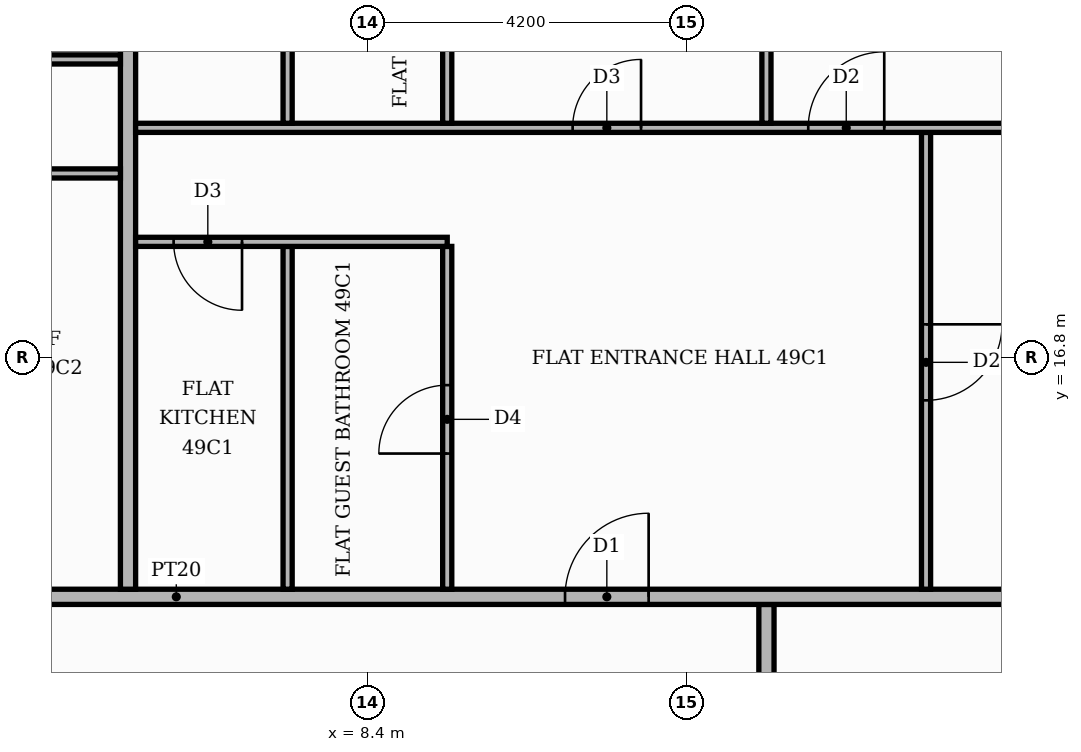
"""IFC4 building model, lengths in metres.
Left out: names, types, materials, properties, quantities, classifications, styles, units other than length and angle.
Written with IfcOpenShell. Run it as: python <this file> out.ifc"""

import sys

from ifc_helpers import new_model, si_unit, direction, frame, frame_2d, origin, place, context, subcontext, project, spatial, rectangle, extrude, element, fill, save


model = new_model("IFC4")
c1 = context("Model", 3, precision=1e-05, world=origin(), true_north=direction((0.0, 1.0)))
c2 = subcontext(c1, "Body", "Model", "MODEL_VIEW")
j1 = project(units=[si_unit("LENGTHUNIT", "METRE"), si_unit("PLANEANGLEUNIT", "RADIAN")], contexts=[c1])
p1 = place(None, origin())
s1 = spatial("IfcSite", under=j1, at=p1, CompositionType="ELEMENT")
p2 = place(p1, origin())
s2 = spatial("IfcBuilding", under=s1, at=p2, CompositionType="ELEMENT")
p3 = place(p2, frame((0.0, 0.0, 207.9)))
s3 = spatial("IfcBuildingStorey", under=s2, at=p3, CompositionType="ELEMENT", Elevation=207.9)
p4 = place(p3, frame((13.65, 11.1, 0.0), z_axis=(0.0, 0.0, 1.0), x_axis=(0.0, 1.0, 0.0)))
e1 = element("IfcWall", 1, at=p4, inside=s3, PredefinedType="PARTITIONING", context=c2, shape_type="SweptSolid", body=[
    extrude(rectangle(XDim=2.45, YDim=0.2, at=frame_2d((1.225, 0.0))), origin(), (0.0, 0.0, 1.0), 3.48),
])
p5 = place(p3, frame((-13.65, 13.65, 0.0), z_axis=(0.0, 0.0, 1.0), x_axis=(1.0, 0.0, 0.0)))
e2 = element("IfcWall", 2, at=p5, inside=s3, PredefinedType="PARTITIONING", context=c2, shape_type="SweptSolid", body=[
    extrude(rectangle(XDim=39.07, YDim=0.2, at=frame_2d((19.535, 0.0))), origin(), (0.0, 0.0, 1.0), 3.48),
])
p6 = place(p5, frame((24.65, 0.0, 0.0)))
e3 = element("IfcOpeningElement", 3, at=p6, cuts=e2, PredefinedType="OPENING", context=c2, shape_type="SweptSolid", body=[
    extrude(rectangle(XDim=1.1, YDim=2.4, at=frame_2d((0.55, 1.2))), frame((0.0, 0.11, 0.0), z_axis=(0.0, -1.0, 0.0), x_axis=(1.0, 0.0, 0.0)), (0.0, 0.0, 1.0), 0.22),
])
p7 = place(p5, frame((12.05, 0.0, 0.0)))
e4 = element("IfcOpeningElement", 4, at=p7, cuts=e2, PredefinedType="OPENING", context=c2, shape_type="SweptSolid", body=[
    extrude(rectangle(XDim=1.1, YDim=2.4, at=frame_2d((0.55, 1.2))), frame((0.0, 0.11, 0.0), z_axis=(0.0, -1.0, 0.0), x_axis=(1.0, 0.0, 0.0)), (0.0, 0.0, 1.0), 0.22),
])
p8 = place(p3, frame((5.25, 13.75, 0.0), z_axis=(0.0, 0.0, 1.0), x_axis=(0.0, 1.0, 0.0)))
e5 = element("IfcWall", 5, at=p8, inside=s3, PredefinedType="PARTITIONING", context=c2, shape_type="SweptSolid", body=[
    extrude(rectangle(XDim=11.67, YDim=0.2, at=frame_2d((5.835, 0.0))), origin(), (0.0, 0.0, 1.0), 3.48),
])
p9 = place(p3, frame((7.35, 13.75, 0.0), z_axis=(0.0, 0.0, 1.0), x_axis=(0.0, 1.0, 0.0)))
e6 = element("IfcWall", 6, at=p9, inside=s3, PredefinedType="PARTITIONING", context=c2, shape_type="SweptSolid", body=[
    extrude(rectangle(XDim=4.51, YDim=0.12, at=frame_2d((2.255, 0.0))), origin(), (0.0, 0.0, 1.0), 3.48),
])
p10 = place(p3, frame((9.45, 13.75, 0.0), z_axis=(0.0, 0.0, 1.0), x_axis=(0.0, 1.0, 0.0)))
e7 = element("IfcWall", 7, at=p10, inside=s3, PredefinedType="PARTITIONING", context=c2, shape_type="SweptSolid", body=[
    extrude(rectangle(XDim=4.51, YDim=0.12, at=frame_2d((2.255, 0.0))), origin(), (0.0, 0.0, 1.0), 3.48),
])
p11 = place(p10, frame((1.785, 0.0, 0.0)))
e8 = element("IfcOpeningElement", 8, at=p11, cuts=e7, PredefinedType="OPENING", context=c2, shape_type="SweptSolid", body=[
    extrude(rectangle(XDim=0.9, YDim=2.1, at=frame_2d((0.45, 1.05))), frame((0.0, 0.07, 0.0), z_axis=(0.0, -1.0, 0.0), x_axis=(1.0, 0.0, 0.0)), (0.0, 0.0, 1.0), 0.14),
])
p12 = place(p3, frame((15.75, 13.75, 0.0), z_axis=(0.0, 0.0, 1.0), x_axis=(0.0, 1.0, 0.0)))
e9 = element("IfcWall", 9, at=p12, inside=s3, PredefinedType="PARTITIONING", context=c2, shape_type="SweptSolid", body=[
    extrude(rectangle(XDim=6.01, YDim=0.12, at=frame_2d((3.005, 0.0))), origin(), (0.0, 0.0, 1.0), 3.48),
])
p13 = place(p12, frame((2.485, 0.0, 0.0)))
e10 = element("IfcOpeningElement", 10, at=p13, cuts=e9, PredefinedType="OPENING", context=c2, shape_type="SweptSolid", body=[
    extrude(rectangle(XDim=1.0, YDim=2.1, at=frame_2d((0.5, 1.05))), frame((0.0, 0.07, 0.0), z_axis=(0.0, -1.0, 0.0), x_axis=(1.0, 0.0, 0.0)), (0.0, 0.0, 1.0), 0.14),
])
p14 = place(p3, frame((5.35, 18.32, 0.0), z_axis=(0.0, 0.0, 1.0), x_axis=(1.0, 0.0, 0.0)))
e11 = element("IfcWall", 11, at=p14, inside=s3, PredefinedType="PARTITIONING", context=c2, shape_type="SweptSolid", body=[
    extrude(rectangle(XDim=4.1, YDim=0.12, at=frame_2d((2.05, 0.0))), origin(), (0.0, 0.0, 1.0), 3.48),
])
p15 = place(p14, frame((0.5, 0.0, 0.0)))
e12 = element("IfcOpeningElement", 12, at=p15, cuts=e11, PredefinedType="OPENING", context=c2, shape_type="SweptSolid", body=[
    extrude(rectangle(XDim=0.9, YDim=2.1, at=frame_2d((0.45, 1.05))), frame((0.0, 0.07, 0.0), z_axis=(0.0, -1.0, 0.0), x_axis=(1.0, 0.0, 0.0)), (0.0, 0.0, 1.0), 0.14),
])
p16 = place(p3, frame((1.05, 19.22, 0.0), z_axis=(0.0, 0.0, 1.0), x_axis=(1.0, 0.0, 0.0)))
e13 = element("IfcWall", 13, at=p16, inside=s3, PredefinedType="PARTITIONING", context=c2, shape_type="SweptSolid", body=[
    extrude(rectangle(XDim=4.1, YDim=0.12, at=frame_2d((2.05, 0.0))), origin(), (0.0, 0.0, 1.0), 3.48),
])
p17 = place(p3, frame((5.35, 19.82, 0.0), z_axis=(0.0, 0.0, 1.0), x_axis=(1.0, 0.0, 0.0)))
e14 = element("IfcWall", 14, at=p17, inside=s3, PredefinedType="PARTITIONING", context=c2, shape_type="SweptSolid", body=[
    extrude(rectangle(XDim=12.25, YDim=0.12, at=frame_2d((6.125, 0.0))), origin(), (0.0, 0.0, 1.0), 3.48),
])
p18 = place(p17, frame((8.85, 0.0, 0.0)))
e15 = element("IfcOpeningElement", 15, at=p18, cuts=e14, PredefinedType="OPENING", context=c2, shape_type="SweptSolid", body=[
    extrude(rectangle(XDim=1.0, YDim=2.1, at=frame_2d((0.5, 1.05))), frame((0.0, 0.07, 0.0), z_axis=(0.0, -1.0, 0.0), x_axis=(1.0, 0.0, 0.0)), (0.0, 0.0, 1.0), 0.14),
])
p19 = place(p17, frame((5.75, 0.0, 0.0)))
e16 = element("IfcOpeningElement", 16, at=p19, cuts=e14, PredefinedType="OPENING", context=c2, shape_type="SweptSolid", body=[
    extrude(rectangle(XDim=0.9, YDim=2.1, at=frame_2d((0.45, 1.05))), frame((0.0, 0.07, 0.0), z_axis=(0.0, -1.0, 0.0), x_axis=(1.0, 0.0, 0.0)), (0.0, 0.0, 1.0), 0.14),
])
p20 = place(p3, frame((7.35, 19.88, 0.0), z_axis=(0.0, 0.0, 1.0), x_axis=(0.0, 1.0, 0.0)))
e17 = element("IfcWall", 17, at=p20, inside=s3, PredefinedType="PARTITIONING", context=c2, shape_type="SweptSolid", body=[
    extrude(rectangle(XDim=5.54, YDim=0.12, at=frame_2d((2.77, 0.0))), origin(), (0.0, 0.0, 1.0), 3.48),
])
p21 = place(p20, frame((2.44, 0.0, 0.0)))
e18 = element("IfcOpeningElement", 18, at=p21, cuts=e17, PredefinedType="OPENING", context=c2, shape_type="SweptSolid", body=[
    extrude(rectangle(XDim=0.9, YDim=2.1, at=frame_2d((0.45, 1.05))), frame((0.0, 0.07, 0.0), z_axis=(0.0, -1.0, 0.0), x_axis=(1.0, 0.0, 0.0)), (0.0, 0.0, 1.0), 0.14),
])
p22 = place(p3, frame((9.45, 19.88, 0.0), z_axis=(0.0, 0.0, 1.0), x_axis=(0.0, 1.0, 0.0)))
e19 = element("IfcWall", 19, at=p22, inside=s3, PredefinedType="PARTITIONING", context=c2, shape_type="SweptSolid", body=[
    extrude(rectangle(XDim=5.54, YDim=0.12, at=frame_2d((2.77, 0.0))), origin(), (0.0, 0.0, 1.0), 3.48),
])
p23 = place(p22, frame((2.44, 0.0, 0.0)))
e20 = element("IfcOpeningElement", 20, at=p23, cuts=e19, PredefinedType="OPENING", context=c2, shape_type="SweptSolid", body=[
    extrude(rectangle(XDim=0.9, YDim=2.1, at=frame_2d((0.45, 1.05))), frame((0.0, 0.07, 0.0), z_axis=(0.0, -1.0, 0.0), x_axis=(1.0, 0.0, 0.0)), (0.0, 0.0, 1.0), 0.14),
])
p24 = place(p3, frame((13.65, 19.88, 0.0), z_axis=(0.0, 0.0, 1.0), x_axis=(0.0, 1.0, 0.0)))
e21 = element("IfcWall", 21, at=p24, inside=s3, PredefinedType="PARTITIONING", context=c2, shape_type="SweptSolid", body=[
    extrude(rectangle(XDim=5.54, YDim=0.12, at=frame_2d((2.77, 0.0))), origin(), (0.0, 0.0, 1.0), 3.48),
])
p25 = place(p3, frame((-13.55, 20.72, 0.0), z_axis=(0.0, 0.0, 1.0), x_axis=(1.0, 0.0, 0.0)))
e22 = element("IfcWall", 22, at=p25, inside=s3, PredefinedType="PARTITIONING", context=c2, shape_type="SweptSolid", body=[
    extrude(rectangle(XDim=18.7, YDim=0.12, at=frame_2d((9.35, 0.0))), origin(), (0.0, 0.0, 1.0), 3.48),
])
p26 = place(p25, frame((16.2, 0.0, 0.0)))
e23 = element("IfcOpeningElement", 23, at=p26, cuts=e22, PredefinedType="OPENING", context=c2, shape_type="SweptSolid", body=[
    extrude(rectangle(XDim=1.0, YDim=2.1, at=frame_2d((0.5, 1.05))), frame((0.0, 0.07, 0.0), z_axis=(0.0, -1.0, 0.0), x_axis=(1.0, 0.0, 0.0)), (0.0, 0.0, 1.0), 0.14),
])
p27 = place(p25, frame((12.05, 0.0, 0.0)))
e24 = element("IfcOpeningElement", 24, at=p27, cuts=e22, PredefinedType="OPENING", context=c2, shape_type="SweptSolid", body=[
    extrude(rectangle(XDim=0.9, YDim=2.1, at=frame_2d((0.45, 1.05))), frame((0.0, 0.07, 0.0), z_axis=(0.0, -1.0, 0.0), x_axis=(1.0, 0.0, 0.0)), (0.0, 0.0, 1.0), 0.14),
])
p28 = place(p25, frame((5.75, 0.0, 0.0)))
e25 = element("IfcOpeningElement", 25, at=p28, cuts=e22, PredefinedType="OPENING", context=c2, shape_type="SweptSolid", body=[
    extrude(rectangle(XDim=0.9, YDim=2.1, at=frame_2d((0.45, 1.05))), frame((0.0, 0.07, 0.0), z_axis=(0.0, -1.0, 0.0), x_axis=(1.0, 0.0, 0.0)), (0.0, 0.0, 1.0), 0.14),
])
p29 = place(p6, origin())
e26 = element("IfcDoor", 26, at=p29, inside=s3, OperationType="SINGLE_SWING_RIGHT", PredefinedType="DOOR", context=c2, shape_type="SweptSolid", body=[
    extrude(rectangle(XDim=1.1, YDim=2.4, at=frame_2d((0.55, 1.2))), frame((0.0, 0.025, 0.0), z_axis=(0.0, -1.0, 0.0), x_axis=(1.0, 0.0, 0.0)), (0.0, 0.0, 1.0), 0.05),
])
fill(e3, e26)
p30 = place(p13, frame((1.0, 0.0, 0.0), z_axis=(0.0, 0.0, 1.0), x_axis=(-1.0, 0.0, 0.0)))
e27 = element("IfcDoor", 27, at=p30, inside=s3, OperationType="SINGLE_SWING_RIGHT", PredefinedType="DOOR", context=c2, shape_type="SweptSolid", body=[
    extrude(rectangle(XDim=1.0, YDim=2.1, at=frame_2d((0.5, 1.05))), frame((0.0, 0.025, 0.0), z_axis=(0.0, -1.0, 0.0), x_axis=(1.0, 0.0, 0.0)), (0.0, 0.0, 1.0), 0.05),
])
fill(e10, e27)
p31 = place(p11, origin())
e28 = element("IfcDoor", 28, at=p31, inside=s3, OperationType="SINGLE_SWING_LEFT", PredefinedType="DOOR", context=c2, shape_type="SweptSolid", body=[
    extrude(rectangle(XDim=0.9, YDim=2.1, at=frame_2d((0.45, 1.05))), frame((0.0, 0.025, 0.0), z_axis=(0.0, -1.0, 0.0), x_axis=(1.0, 0.0, 0.0)), (0.0, 0.0, 1.0), 0.05),
])
fill(e8, e28)
p32 = place(p15, frame((0.9, 0.0, 0.0), z_axis=(0.0, 0.0, 1.0), x_axis=(-1.0, 0.0, 0.0)))
e29 = element("IfcDoor", 29, at=p32, inside=s3, OperationType="SINGLE_SWING_RIGHT", PredefinedType="DOOR", context=c2, shape_type="SweptSolid", body=[
    extrude(rectangle(XDim=0.9, YDim=2.1, at=frame_2d((0.45, 1.05))), frame((0.0, 0.025, 0.0), z_axis=(0.0, -1.0, 0.0), x_axis=(1.0, 0.0, 0.0)), (0.0, 0.0, 1.0), 0.05),
])
fill(e12, e29)
p33 = place(p18, origin())
e30 = element("IfcDoor", 30, at=p33, inside=s3, OperationType="SINGLE_SWING_RIGHT", PredefinedType="DOOR", context=c2, shape_type="SweptSolid", body=[
    extrude(rectangle(XDim=1.0, YDim=2.1, at=frame_2d((0.5, 1.05))), frame((0.0, 0.025, 0.0), z_axis=(0.0, -1.0, 0.0), x_axis=(1.0, 0.0, 0.0)), (0.0, 0.0, 1.0), 0.05),
])
fill(e15, e30)
p34 = place(p19, origin())
e31 = element("IfcDoor", 31, at=p34, inside=s3, OperationType="SINGLE_SWING_RIGHT", PredefinedType="DOOR", context=c2, shape_type="SweptSolid", body=[
    extrude(rectangle(XDim=0.9, YDim=2.1, at=frame_2d((0.45, 1.05))), frame((0.0, 0.025, 0.0), z_axis=(0.0, -1.0, 0.0), x_axis=(1.0, 0.0, 0.0)), (0.0, 0.0, 1.0), 0.05),
])
fill(e16, e31)
save(model, sys.argv[1])
